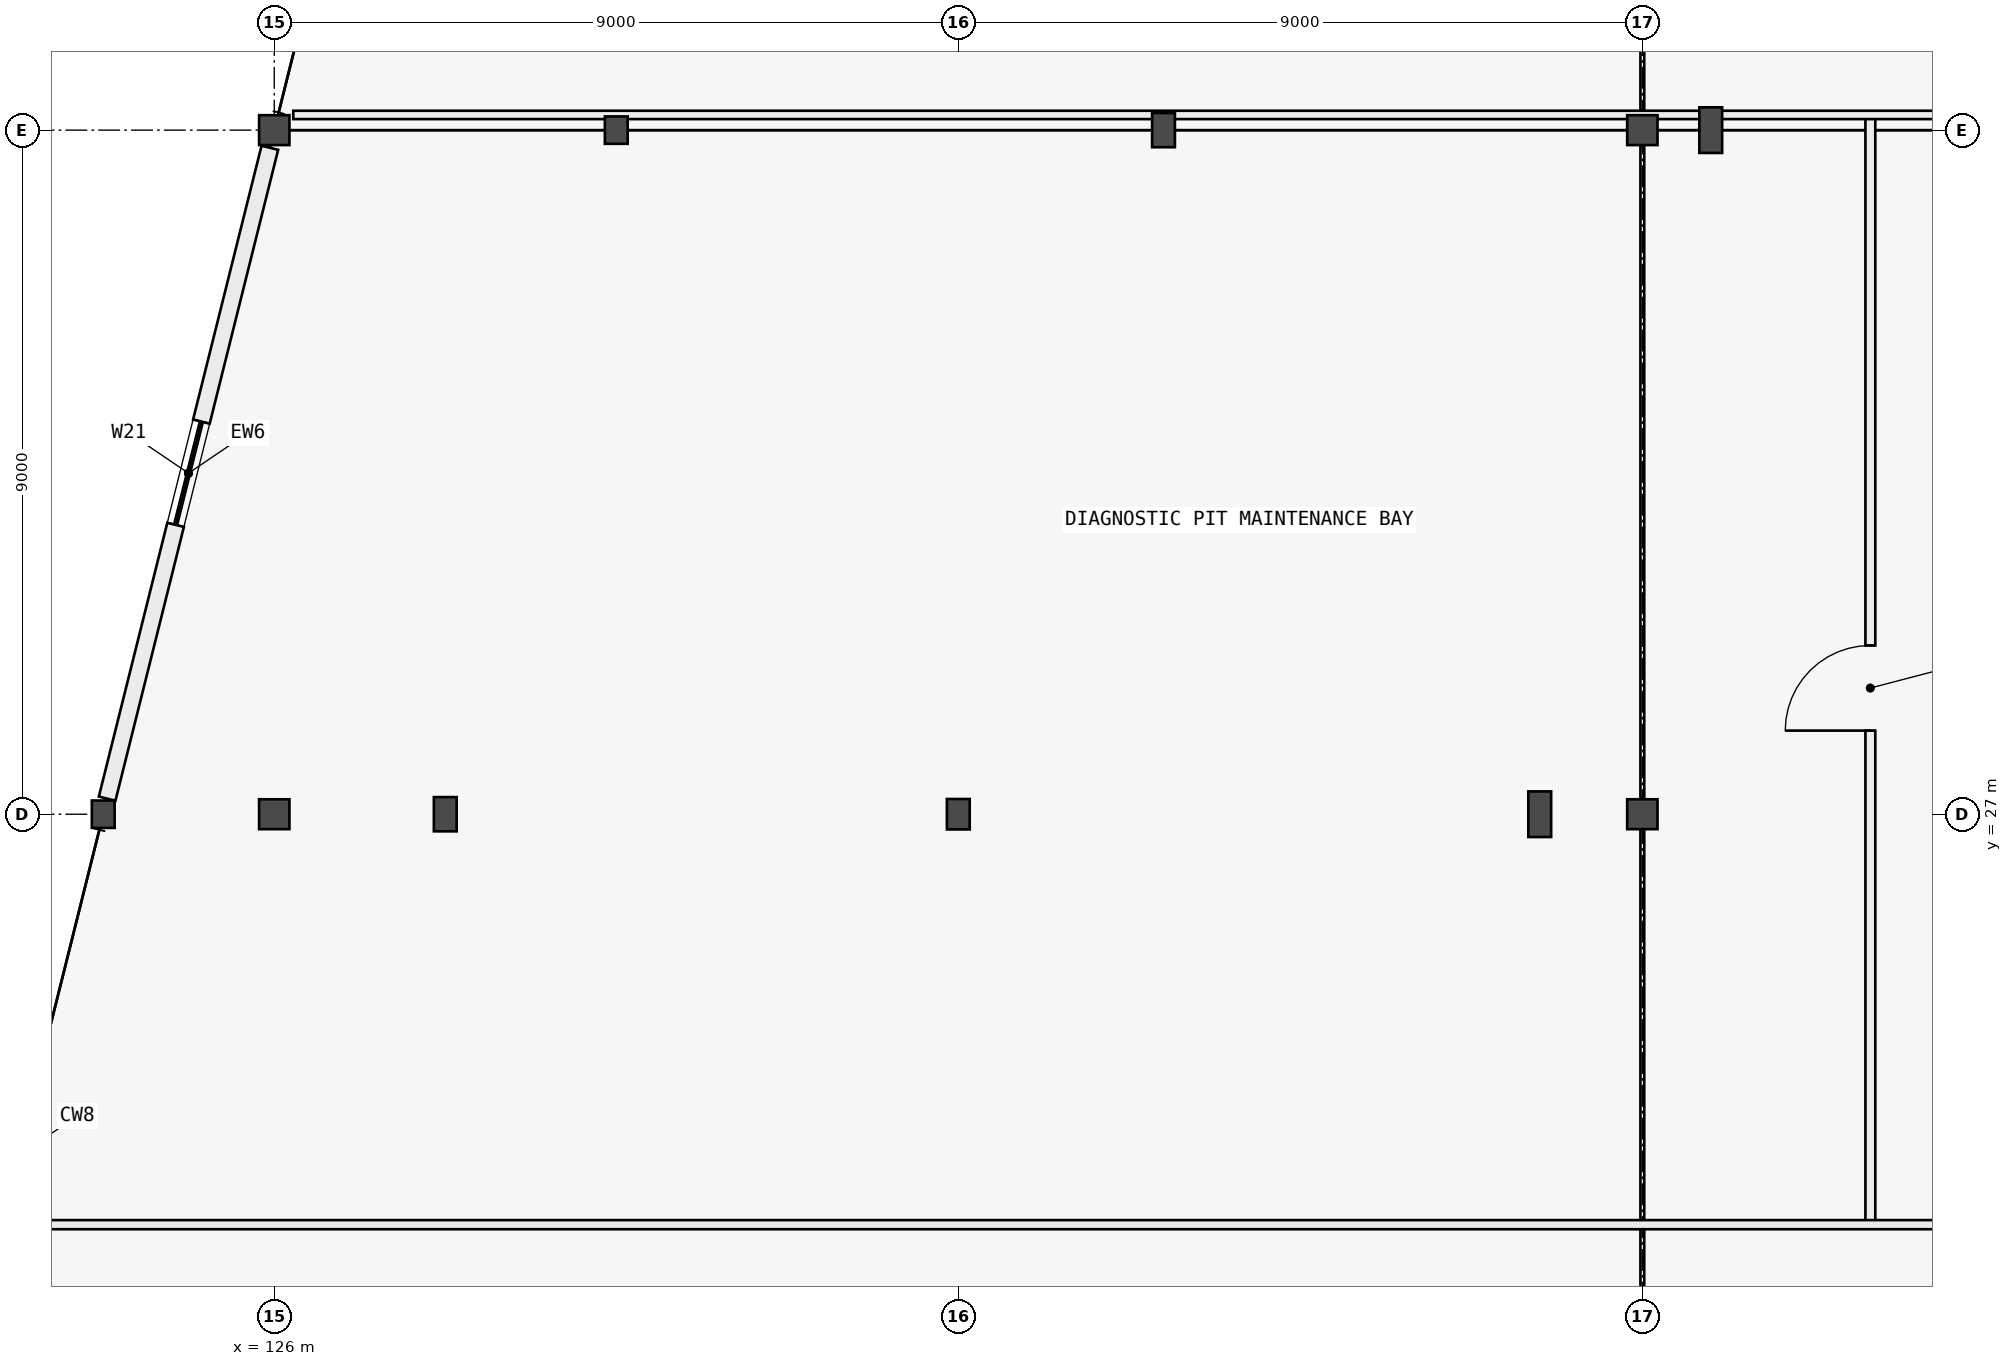
"""IFC4 building model, lengths in metres.
Left out: names, types, materials, properties, quantities, classifications, styles, units other than length and angle.
Written with IfcOpenShell. Run it as: python <this file> out.ifc"""

import sys

from ifc_helpers import new_model, si_unit, direction, frame, frame_2d, origin, origin_2d, place, context, subcontext, project, spatial, rectangle, i_section, extrude, element, fill, save


model = new_model("IFC4")
c1 = context("Model", 3, precision=1e-05, world=origin(), true_north=direction((0.0, 1.0)))
c2 = subcontext(c1, "Body", "Model", "MODEL_VIEW")
j1 = project(units=[si_unit("LENGTHUNIT", "METRE"), si_unit("PLANEANGLEUNIT", "RADIAN")], contexts=[c1])
p1 = place(None, origin())
s1 = spatial("IfcSite", under=j1, at=p1, CompositionType="ELEMENT")
p2 = place(p1, origin())
s2 = spatial("IfcBuilding", under=s1, at=p2, CompositionType="ELEMENT")
p3 = place(p2, origin())
s3 = spatial("IfcBuildingStorey", under=s2, at=p3, CompositionType="ELEMENT", Elevation=0.0)
p4 = place(p3, frame((123.75, 27.0, 0.0), z_axis=(0.0, 0.0, 1.0), x_axis=(1.0, 0.0, 0.0)))
e1 = element("IfcColumn", 1, at=p4, inside=s3, PredefinedType="COLUMN", context=c2, shape_type="SweptSolid", body=[
    extrude(i_section(OverallWidth=0.3, OverallDepth=0.36, WebThickness=0.012, FlangeThickness=0.022, FilletRadius=0.027, at=origin_2d()), origin(), (0.0, 0.0, 1.0), 4.2),
])
p5 = place(p3, frame((126.0, 27.0, 0.0), z_axis=(0.0, 0.0, 1.0), x_axis=(1.0, 0.0, 0.0)))
e2 = element("IfcColumn", 2, at=p5, inside=s3, PredefinedType="COLUMN", context=c2, shape_type="SweptSolid", body=[
    extrude(i_section(OverallWidth=0.399, OverallDepth=0.393, WebThickness=0.018, FlangeThickness=0.028, FilletRadius=0.015, at=origin_2d()), origin(), (0.0, 0.0, 1.0), 4.2),
])
p6 = place(p3, frame((128.25, 27.0, 0.0), z_axis=(0.0, 0.0, 1.0), x_axis=(1.0, 0.0, 0.0)))
e3 = element("IfcColumn", 3, at=p6, inside=s3, PredefinedType="COLUMN", context=c2, shape_type="SweptSolid", body=[
    extrude(i_section(OverallWidth=0.3, OverallDepth=0.45, WebThickness=0.014, FlangeThickness=0.026, FilletRadius=0.027, at=origin_2d()), origin(), (0.0, 0.0, 1.0), 4.2),
])
p7 = place(p3, frame((135.0, 27.0, 0.0), z_axis=(0.0, 0.0, 1.0), x_axis=(1.0, 0.0, 0.0)))
e4 = element("IfcColumn", 4, at=p7, inside=s3, PredefinedType="COLUMN", context=c2, shape_type="SweptSolid", body=[
    extrude(i_section(OverallWidth=0.3, OverallDepth=0.4, WebThickness=0.013, FlangeThickness=0.024, FilletRadius=0.027, at=origin_2d()), origin(), (0.0, 0.0, 1.0), 4.2),
])
p8 = place(p3, frame((142.65, 27.0, 0.0), z_axis=(0.0, 0.0, 1.0), x_axis=(1.0, 0.0, 0.0)))
e5 = element("IfcColumn", 5, at=p8, inside=s3, PredefinedType="COLUMN", context=c2, shape_type="SweptSolid", body=[
    extrude(i_section(OverallWidth=0.3, OverallDepth=0.6, WebThickness=0.015, FlangeThickness=0.03, FilletRadius=0.027, at=origin_2d()), origin(), (0.0, 0.0, 1.0), 4.2),
])
for number, where, z_axis, x_axis in (
    (6, (144.0, 27.0, 0.0), (0.0, 0.0, 1.0), (1.0, 0.0, 0.0)),
    (7, (126.0, 36.0, 0.0), (0.0, 0.0, 1.0), (1.0, 0.0, 0.0)),
):
    element("IfcColumn", number, at=place(p3, frame(where, z_axis=z_axis, x_axis=x_axis)), inside=s3, PredefinedType="COLUMN", context=c2, shape_type="SweptSolid", body=[
        extrude(i_section(OverallWidth=0.399, OverallDepth=0.393, WebThickness=0.018, FlangeThickness=0.028, FilletRadius=0.015, at=origin_2d()), origin(), (0.0, 0.0, 1.0), 4.2),
    ])
p9 = place(p3, frame((130.5, 36.0, 0.0), z_axis=(0.0, 0.0, 1.0), x_axis=(1.0, 0.0, 0.0)))
e8 = element("IfcColumn", 8, at=p9, inside=s3, PredefinedType="COLUMN", context=c2, shape_type="SweptSolid", body=[
    extrude(i_section(OverallWidth=0.3, OverallDepth=0.36, WebThickness=0.012, FlangeThickness=0.022, FilletRadius=0.027, at=origin_2d()), origin(), (0.0, 0.0, 1.0), 4.2),
])
p10 = place(p3, frame((137.7, 36.0, 0.0), z_axis=(0.0, 0.0, 1.0), x_axis=(1.0, 0.0, 0.0)))
e9 = element("IfcColumn", 9, at=p10, inside=s3, PredefinedType="COLUMN", context=c2, shape_type="SweptSolid", body=[
    extrude(i_section(OverallWidth=0.3, OverallDepth=0.45, WebThickness=0.014, FlangeThickness=0.026, FilletRadius=0.027, at=origin_2d()), origin(), (0.0, 0.0, 1.0), 4.2),
])
p11 = place(p3, frame((144.0, 36.0, 0.0), z_axis=(0.0, 0.0, 1.0), x_axis=(1.0, 0.0, 0.0)))
e10 = element("IfcColumn", 10, at=p11, inside=s3, PredefinedType="COLUMN", context=c2, shape_type="SweptSolid", body=[
    extrude(i_section(OverallWidth=0.399, OverallDepth=0.393, WebThickness=0.018, FlangeThickness=0.028, FilletRadius=0.015, at=origin_2d()), origin(), (0.0, 0.0, 1.0), 4.2),
])
p12 = place(p3, frame((144.9, 36.0, 0.0), z_axis=(0.0, 0.0, 1.0), x_axis=(1.0, 0.0, 0.0)))
e11 = element("IfcColumn", 11, at=p12, inside=s3, PredefinedType="COLUMN", context=c2, shape_type="SweptSolid", body=[
    extrude(i_section(OverallWidth=0.3, OverallDepth=0.6, WebThickness=0.015, FlangeThickness=0.03, FilletRadius=0.027, at=origin_2d()), origin(), (0.0, 0.0, 1.0), 4.2),
])
p13 = place(p3, frame((123.801, 27.205, 0.0), z_axis=(0.0, 0.0, 1.0), x_axis=(0.242509593434, 0.970149007675, 0.0)))
e12 = element("IfcWall", 12, at=p13, inside=s3, PredefinedType="STANDARD", context=c2, shape_type="SweptSolid", body=[
    extrude(rectangle(XDim=8.827, YDim=0.225, at=frame_2d((4.414, 0.0))), origin(), (0.0, 0.0, 1.0), 3.325),
])
p14 = place(p13, frame((3.713, 0.0, 0.95)))
e13 = element("IfcOpeningElement", 13, at=p14, cuts=e12, PredefinedType="OPENING", context=c2, shape_type="SweptSolid", body=[
    extrude(rectangle(XDim=1.4, YDim=2.0, at=frame_2d((0.7, 1.0))), frame((0.0, 0.123, 0.0), z_axis=(0.0, -1.0, 0.0), x_axis=(1.0, 0.0, 0.0)), (0.0, 0.0, 1.0), 0.245),
])
p15 = place(p3, frame((147.0, 21.6, 0.0), z_axis=(0.0, 0.0, 1.0), x_axis=(0.0, 1.0, 0.0)))
e14 = element("IfcWall", 14, at=p15, inside=s3, PredefinedType="PARTITIONING", context=c2, shape_type="SweptSolid", body=[
    extrude(rectangle(XDim=14.6, YDim=0.13, at=frame_2d((7.3, 0.0))), origin(), (0.0, 0.0, 1.0), 3.95),
])
p16 = place(p15, frame((6.5, 0.0, 0.0)))
e15 = element("IfcOpeningElement", 15, at=p16, cuts=e14, PredefinedType="OPENING", context=c2, shape_type="SweptSolid", body=[
    extrude(rectangle(XDim=1.12, YDim=2.15, at=frame_2d((0.56, 1.075))), frame((0.0, 0.075, 0.0), z_axis=(0.0, -1.0, 0.0), x_axis=(1.0, 0.0, 0.0)), (0.0, 0.0, 1.0), 0.15),
])
p17 = place(p3, frame((122.6, 21.6, 0.0), z_axis=(0.0, 0.0, 1.0), x_axis=(1.0, 0.0, 0.0)))
e16 = element("IfcWall", 16, at=p17, inside=s3, PredefinedType="PARTITIONING", context=c2, shape_type="SweptSolid", body=[
    extrude(rectangle(XDim=27.6, YDim=0.12, at=frame_2d((13.8, 0.0))), origin(), (0.0, 0.0, 1.0), 3.95),
])
p18 = place(p3, frame((126.25, 36.2, 0.0), z_axis=(0.0, 0.0, 1.0), x_axis=(1.0, 0.0, 0.0)))
e17 = element("IfcWall", 17, at=p18, inside=s3, PredefinedType="PARTITIONING", context=c2, shape_type="SweptSolid", body=[
    extrude(rectangle(XDim=32.35, YDim=0.11, at=frame_2d((16.175, 0.0))), origin(), (0.0, 0.0, 1.0), 2.425),
])
p19 = place(p14, origin())
e18 = element("IfcWindow", 18, at=p19, inside=s3, PartitioningType="SINGLE_PANEL", PredefinedType="WINDOW", context=c2, shape_type="SweptSolid", body=[
    extrude(rectangle(XDim=1.4, YDim=2.0, at=frame_2d((0.7, 1.0))), frame((0.0, 0.03, 0.0), z_axis=(0.0, -1.0, 0.0), x_axis=(1.0, 0.0, 0.0)), (0.0, 0.0, 1.0), 0.06),
])
fill(e13, e18)
p20 = place(p16, origin())
e19 = element("IfcDoor", 19, at=p20, inside=s3, OperationType="SINGLE_SWING_LEFT", PredefinedType="DOOR", context=c2, shape_type="SweptSolid", body=[
    extrude(rectangle(XDim=1.12, YDim=2.15, at=frame_2d((0.56, 1.075))), frame((0.0, 0.025, 0.0), z_axis=(0.0, -1.0, 0.0), x_axis=(1.0, 0.0, 0.0)), (0.0, 0.0, 1.0), 0.05),
])
fill(e15, e19)
save(model, sys.argv[1])
